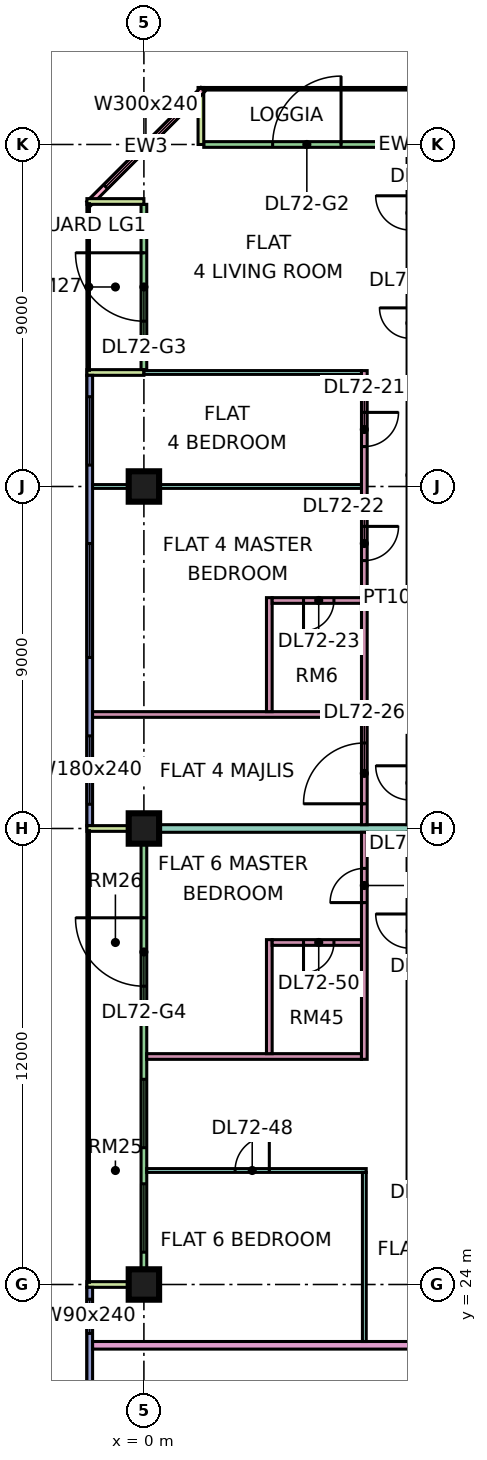
"""IFC4 building model, lengths in metres.
Left out: names, types, materials, properties, quantities, classifications, styles, units other than length and angle.
Written with IfcOpenShell. Run it as: python <this file> out.ifc"""

import sys

from ifc_helpers import new_model, si_unit, direction, frame, frame_2d, origin, origin_2d, place, context, subcontext, project, spatial, rectangle, extrude, element, fill, save


model = new_model("IFC4")
c1 = context("Model", 3, precision=1e-05, world=origin(), true_north=direction((0.0, 1.0)))
c2 = subcontext(c1, "Body", "Model", "MODEL_VIEW")
j1 = project(units=[si_unit("LENGTHUNIT", "METRE"), si_unit("PLANEANGLEUNIT", "RADIAN")], contexts=[c1])
p1 = place(None, origin())
s1 = spatial("IfcSite", under=j1, at=p1, CompositionType="ELEMENT")
p2 = place(p1, origin())
s2 = spatial("IfcBuilding", under=s1, at=p2, CompositionType="ELEMENT")
p3 = place(p2, frame((0.0, 0.0, 307.15)))
s3 = spatial("IfcBuildingStorey", under=s2, at=p3, CompositionType="ELEMENT", Elevation=307.15)
p4 = place(p3, frame((0.0, 24.0, 0.0), z_axis=(0.0, 0.0, 1.0), x_axis=(1.0, 0.0, 0.0)))
e1 = element("IfcColumn", 1, at=p4, inside=s3, PredefinedType="COLUMN", context=c2, shape_type="SweptSolid", body=[
    extrude(rectangle(XDim=0.8, YDim=0.8, at=origin_2d()), origin(), (0.0, 0.0, 1.0), 3.75),
])
p5 = place(p3, frame((0.0, 36.0, 0.0), z_axis=(0.0, 0.0, 1.0), x_axis=(1.0, 0.0, 0.0)))
e2 = element("IfcColumn", 2, at=p5, inside=s3, PredefinedType="COLUMN", context=c2, shape_type="SweptSolid", body=[
    extrude(rectangle(XDim=0.8, YDim=0.8, at=origin_2d()), origin(), (0.0, 0.0, 1.0), 3.75),
])
p6 = place(p3, frame((0.0, 45.0, 0.0), z_axis=(0.0, 0.0, 1.0), x_axis=(1.0, 0.0, 0.0)))
e3 = element("IfcColumn", 3, at=p6, inside=s3, PredefinedType="COLUMN", context=c2, shape_type="SweptSolid", body=[
    extrude(rectangle(XDim=0.8, YDim=0.8, at=origin_2d()), origin(), (0.0, 0.0, 1.0), 3.75),
])
p7 = place(p3, frame((11.925, 54.0, 0.0), z_axis=(0.0, 0.0, 1.0), x_axis=(-1.0, 0.0, 0.0)))
e4 = element("IfcWall", 4, at=p7, inside=s3, PredefinedType="SOLIDWALL", context=c2, shape_type="SweptSolid", body=[
    extrude(rectangle(XDim=10.35, YDim=0.15, at=frame_2d((5.175, 0.0))), origin(), (0.0, 0.0, 1.0), 3.35),
])
p8 = place(p7, frame((6.738, 0.0, 0.0)))
e5 = element("IfcOpeningElement", 5, at=p8, cuts=e4, PredefinedType="OPENING", context=c2, shape_type="SweptSolid", body=[
    extrude(rectangle(XDim=1.8, YDim=2.4, at=frame_2d((0.9, 1.2))), frame((0.0, 0.085, 0.0), z_axis=(0.0, -1.0, 0.0), x_axis=(1.0, 0.0, 0.0)), (0.0, 0.0, 1.0), 0.17),
])
p9 = place(p3, frame((1.5, 55.5, 0.0), z_axis=(0.0, 0.0, 1.0), x_axis=(0.0, -1.0, 0.0)))
e6 = element("IfcWall", 6, at=p9, inside=s3, PredefinedType="SOLIDWALL", context=c2, shape_type="SweptSolid", body=[
    extrude(rectangle(XDim=1.5, YDim=0.15, at=frame_2d((0.75, 0.0))), origin(), (0.0, 0.0, 1.0), 3.35),
])
p10 = place(p3, frame((1.553, 55.447, 0.0), z_axis=(0.0, 0.0, 1.0), x_axis=(-0.707106781187, -0.707106781187, 0.0)))
e7 = element("IfcWall", 7, at=p10, inside=s3, PredefinedType="SOLIDWALL", context=c2, shape_type="SweptSolid", body=[
    extrude(rectangle(XDim=4.243, YDim=0.15, at=frame_2d((2.121, 0.0))), origin(), (0.0, 0.0, 1.0), 3.35),
])
p11 = place(p10, frame((0.621, 0.0, 0.45)))
e8 = element("IfcOpeningElement", 8, at=p11, cuts=e7, PredefinedType="OPENING", context=c2, shape_type="SweptSolid", body=[
    extrude(rectangle(XDim=3.0, YDim=2.4, at=frame_2d((1.5, 1.2))), frame((0.0, 0.085, 0.0), z_axis=(0.0, -1.0, 0.0), x_axis=(1.0, 0.0, 0.0)), (0.0, 0.0, 1.0), 0.17),
])
p12 = place(p3, frame((0.0, 52.425, 0.0), z_axis=(0.0, 0.0, 1.0), x_axis=(0.0, -1.0, 0.0)))
e9 = element("IfcWall", 9, at=p12, inside=s3, PredefinedType="SOLIDWALL", context=c2, shape_type="SweptSolid", body=[
    extrude(rectangle(XDim=4.35, YDim=0.15, at=frame_2d((2.175, 0.0))), origin(), (0.0, 0.0, 1.0), 3.35),
])
p13 = place(p12, frame((1.275, 0.0, 0.0)))
e10 = element("IfcOpeningElement", 10, at=p13, cuts=e9, PredefinedType="OPENING", context=c2, shape_type="SweptSolid", body=[
    extrude(rectangle(XDim=1.8, YDim=2.4, at=frame_2d((0.9, 1.2))), frame((0.0, 0.085, 0.0), z_axis=(0.0, -1.0, 0.0), x_axis=(1.0, 0.0, 0.0)), (0.0, 0.0, 1.0), 0.17),
])
for number, where, z_axis, x_axis in (
    (11, (-1.5, 52.5, 0.0), (0.0, 0.0, 1.0), (1.0, 0.0, 0.0)),
    (12, (-1.5, 48.0, 0.0), (0.0, 0.0, 1.0), (1.0, 0.0, 0.0)),
):
    element("IfcWall", number, at=place(p3, frame(where, z_axis=z_axis, x_axis=x_axis)), inside=s3, PredefinedType="SOLIDWALL", context=c2, shape_type="SweptSolid", body=[
        extrude(rectangle(XDim=1.5, YDim=0.15, at=frame_2d((0.75, 0.0))), origin(), (0.0, 0.0, 1.0), 3.35),
    ])
p14 = place(p3, frame((-1.425, 47.925, 0.0), z_axis=(0.0, 0.0, 1.0), x_axis=(0.0, -1.0, 0.0)))
e13 = element("IfcWall", 13, at=p14, inside=s3, PredefinedType="SOLIDWALL", context=c2, shape_type="SweptSolid", body=[
    extrude(rectangle(XDim=11.85, YDim=0.15, at=frame_2d((5.925, 0.0))), origin(), (0.0, 0.0, 1.0), 3.35),
])
p15 = place(p14, frame((0.562, 0.0, 0.45)))
e14 = element("IfcOpeningElement", 14, at=p15, cuts=e13, PredefinedType="OPENING", context=c2, shape_type="SweptSolid", body=[
    extrude(rectangle(XDim=1.8, YDim=2.4, at=frame_2d((0.9, 1.2))), frame((0.0, 0.085, 0.0), z_axis=(0.0, -1.0, 0.0), x_axis=(1.0, 0.0, 0.0)), (0.0, 0.0, 1.0), 0.17),
])
p16 = place(p14, frame((4.425, 0.0, 0.45)))
e15 = element("IfcOpeningElement", 15, at=p16, cuts=e13, PredefinedType="OPENING", context=c2, shape_type="SweptSolid", body=[
    extrude(rectangle(XDim=3.0, YDim=2.4, at=frame_2d((1.5, 1.2))), frame((0.0, 0.085, 0.0), z_axis=(0.0, -1.0, 0.0), x_axis=(1.0, 0.0, 0.0)), (0.0, 0.0, 1.0), 0.17),
])
p17 = place(p14, frame((9.488, 0.0, 0.45)))
e16 = element("IfcOpeningElement", 16, at=p17, cuts=e13, PredefinedType="OPENING", context=c2, shape_type="SweptSolid", body=[
    extrude(rectangle(XDim=1.8, YDim=2.4, at=frame_2d((0.9, 1.2))), frame((0.0, 0.085, 0.0), z_axis=(0.0, -1.0, 0.0), x_axis=(1.0, 0.0, 0.0)), (0.0, 0.0, 1.0), 0.17),
])
p18 = place(p3, frame((0.0, 35.925, 0.0), z_axis=(0.0, 0.0, 1.0), x_axis=(0.0, -1.0, 0.0)))
e17 = element("IfcWall", 17, at=p18, inside=s3, PredefinedType="SOLIDWALL", context=c2, shape_type="SweptSolid", body=[
    extrude(rectangle(XDim=11.85, YDim=0.15, at=frame_2d((5.925, 0.0))), origin(), (0.0, 0.0, 1.0), 3.35),
])
p19 = place(p18, frame((2.275, 0.0, 0.0)))
e18 = element("IfcOpeningElement", 18, at=p19, cuts=e17, PredefinedType="OPENING", context=c2, shape_type="SweptSolid", body=[
    extrude(rectangle(XDim=1.8, YDim=2.4, at=frame_2d((0.9, 1.2))), frame((0.0, 0.085, 0.0), z_axis=(0.0, -1.0, 0.0), x_axis=(1.0, 0.0, 0.0)), (0.0, 0.0, 1.0), 0.17),
])
p20 = place(p18, frame((6.525, 0.0, 0.45)))
e19 = element("IfcOpeningElement", 19, at=p20, cuts=e17, PredefinedType="OPENING", context=c2, shape_type="SweptSolid", body=[
    extrude(rectangle(XDim=1.8, YDim=2.4, at=frame_2d((0.9, 1.2))), frame((0.0, 0.085, 0.0), z_axis=(0.0, -1.0, 0.0), x_axis=(1.0, 0.0, 0.0)), (0.0, 0.0, 1.0), 0.17),
])
p21 = place(p18, frame((9.275, 0.0, 0.45)))
e20 = element("IfcOpeningElement", 20, at=p21, cuts=e17, PredefinedType="OPENING", context=c2, shape_type="SweptSolid", body=[
    extrude(rectangle(XDim=1.8, YDim=2.4, at=frame_2d((0.9, 1.2))), frame((0.0, 0.085, 0.0), z_axis=(0.0, -1.0, 0.0), x_axis=(1.0, 0.0, 0.0)), (0.0, 0.0, 1.0), 0.17),
])
for number, where, z_axis, x_axis in (
    (21, (-1.5, 36.0, 0.0), (0.0, 0.0, 1.0), (1.0, 0.0, 0.0)),
    (22, (-1.5, 24.0, 0.0), (0.0, 0.0, 1.0), (1.0, 0.0, 0.0)),
):
    element("IfcWall", number, at=place(p3, frame(where, z_axis=z_axis, x_axis=x_axis)), inside=s3, PredefinedType="SOLIDWALL", context=c2, shape_type="SweptSolid", body=[
        extrude(rectangle(XDim=1.5, YDim=0.15, at=frame_2d((0.75, 0.0))), origin(), (0.0, 0.0, 1.0), 3.35),
    ])
p22 = place(p3, frame((-1.425, 23.925, 0.0), z_axis=(0.0, 0.0, 1.0), x_axis=(0.0, -1.0, 0.0)))
e23 = element("IfcWall", 23, at=p22, inside=s3, PredefinedType="SOLIDWALL", context=c2, shape_type="SweptSolid", body=[
    extrude(rectangle(XDim=11.425, YDim=0.15, at=frame_2d((5.712, 0.0))), origin(), (0.0, 0.0, 1.0), 3.35),
])
p23 = place(p22, frame((0.312, 0.0, 0.45)))
e24 = element("IfcOpeningElement", 24, at=p23, cuts=e23, PredefinedType="OPENING", context=c2, shape_type="SweptSolid", body=[
    extrude(rectangle(XDim=0.9, YDim=2.4, at=frame_2d((0.45, 1.2))), frame((0.0, 0.085, 0.0), z_axis=(0.0, -1.0, 0.0), x_axis=(1.0, 0.0, 0.0)), (0.0, 0.0, 1.0), 0.17),
])
p24 = place(p22, frame((6.175, 0.0, 0.45)))
e25 = element("IfcOpeningElement", 25, at=p24, cuts=e23, PredefinedType="OPENING", context=c2, shape_type="SweptSolid", body=[
    extrude(rectangle(XDim=3.0, YDim=2.4, at=frame_2d((1.5, 1.2))), frame((0.0, 0.085, 0.0), z_axis=(0.0, -1.0, 0.0), x_axis=(1.0, 0.0, 0.0)), (0.0, 0.0, 1.0), 0.17),
])
p25 = place(p3, frame((-1.351, 39.0, 0.0), z_axis=(0.0, 0.0, 1.0), x_axis=(1.0, 0.0, 0.0)))
e26 = element("IfcWall", 26, at=p25, inside=s3, PredefinedType="PARTITIONING", context=c2, shape_type="SweptSolid", body=[
    extrude(rectangle(XDim=7.076, YDim=0.15, at=frame_2d((3.538, 0.0))), origin(), (0.0, 0.0, 1.0), 3.35),
])
p26 = place(p3, frame((-1.351, 45.0, 0.0), z_axis=(0.0, 0.0, 1.0), x_axis=(1.0, 0.0, 0.0)))
e27 = element("IfcWall", 27, at=p26, inside=s3, PredefinedType="PARTITIONING", context=c2, shape_type="SweptSolid", body=[
    extrude(rectangle(XDim=7.076, YDim=0.1, at=frame_2d((3.538, 0.0))), origin(), (0.0, 0.0, 1.0), 3.35),
])
p27 = place(p3, frame((-1.35, 22.4, 0.0), z_axis=(0.0, 0.0, 1.0), x_axis=(1.0, 0.0, 0.0)))
e28 = element("IfcWall", 28, at=p27, inside=s3, PredefinedType="PARTITIONING", context=c2, shape_type="SweptSolid", body=[
    extrude(rectangle(XDim=13.65, YDim=0.2, at=frame_2d((6.825, 0.0))), origin(), (0.0, 0.0, 1.0), 3.35),
])
e29 = element("IfcWall", 29, at=p5, inside=s3, PredefinedType="PARTITIONING", context=c2, shape_type="SweptSolid", body=[
    extrude(rectangle(XDim=12.3, YDim=0.2, at=frame_2d((6.15, 0.0))), origin(), (0.0, 0.0, 1.0), 3.35),
])
p28 = place(p3, frame((0.0, 48.0, 0.0), z_axis=(0.0, 0.0, 1.0), x_axis=(1.0, 0.0, 0.0)))
e30 = element("IfcWall", 30, at=p28, inside=s3, PredefinedType="PARTITIONING", context=c2, shape_type="SweptSolid", body=[
    extrude(rectangle(XDim=5.725, YDim=0.1, at=frame_2d((2.863, 0.0))), origin(), (0.0, 0.0, 1.0), 3.35),
])
p29 = place(p3, frame((0.074, 27.0, 0.0), z_axis=(0.0, 0.0, 1.0), x_axis=(1.0, 0.0, 0.0)))
e31 = element("IfcWall", 31, at=p29, inside=s3, PredefinedType="PARTITIONING", context=c2, shape_type="SweptSolid", body=[
    extrude(rectangle(XDim=5.776, YDim=0.1, at=frame_2d((2.888, 0.0))), origin(), (0.0, 0.0, 1.0), 3.35),
])
p30 = place(p29, frame((2.326, 0.0, 0.0)))
e32 = element("IfcOpeningElement", 32, at=p30, cuts=e31, PredefinedType="OPENING", context=c2, shape_type="SweptSolid", body=[
    extrude(rectangle(XDim=0.9, YDim=2.1, at=frame_2d((0.45, 1.05))), frame((0.0, 0.06, 0.0), z_axis=(0.0, -1.0, 0.0), x_axis=(1.0, 0.0, 0.0)), (0.0, 0.0, 1.0), 0.12),
])
p31 = place(p3, frame((0.074, 30.0, 0.0), z_axis=(0.0, 0.0, 1.0), x_axis=(1.0, 0.0, 0.0)))
e33 = element("IfcWall", 33, at=p31, inside=s3, PredefinedType="PARTITIONING", context=c2, shape_type="SweptSolid", body=[
    extrude(rectangle(XDim=5.651, YDim=0.15, at=frame_2d((2.826, 0.0))), origin(), (0.0, 0.0, 1.0), 3.35),
])
for number, where, z_axis, x_axis in (
    (34, (3.3, 30.075, 0.0), (0.0, 0.0, 1.0), (0.0, 1.0, 0.0)),
    (35, (3.3, 39.075, 0.0), (0.0, 0.0, 1.0), (0.0, 1.0, 0.0)),
):
    element("IfcWall", number, at=place(p3, frame(where, z_axis=z_axis, x_axis=x_axis)), inside=s3, PredefinedType="PARTITIONING", context=c2, shape_type="SweptSolid", body=[
        extrude(rectangle(XDim=3.0, YDim=0.15, at=frame_2d((1.5, 0.0))), origin(), (0.0, 0.0, 1.0), 3.35),
    ])
p32 = place(p3, frame((3.375, 33.0, 0.0), z_axis=(0.0, 0.0, 1.0), x_axis=(1.0, 0.0, 0.0)))
e36 = element("IfcWall", 36, at=p32, inside=s3, PredefinedType="PARTITIONING", context=c2, shape_type="SweptSolid", body=[
    extrude(rectangle(XDim=2.35, YDim=0.15, at=frame_2d((1.175, 0.0))), origin(), (0.0, 0.0, 1.0), 3.35),
])
p33 = place(p32, frame((0.825, 0.0, 0.0)))
e37 = element("IfcOpeningElement", 37, at=p33, cuts=e36, PredefinedType="OPENING", context=c2, shape_type="SweptSolid", body=[
    extrude(rectangle(XDim=0.8, YDim=2.1, at=frame_2d((0.4, 1.05))), frame((0.0, 0.085, 0.0), z_axis=(0.0, -1.0, 0.0), x_axis=(1.0, 0.0, 0.0)), (0.0, 0.0, 1.0), 0.17),
])
p34 = place(p3, frame((3.375, 42.0, 0.0), z_axis=(0.0, 0.0, 1.0), x_axis=(1.0, 0.0, 0.0)))
e38 = element("IfcWall", 38, at=p34, inside=s3, PredefinedType="PARTITIONING", context=c2, shape_type="SweptSolid", body=[
    extrude(rectangle(XDim=2.35, YDim=0.15, at=frame_2d((1.175, 0.0))), origin(), (0.0, 0.0, 1.0), 3.35),
])
p35 = place(p34, frame((0.825, 0.0, 0.0)))
e39 = element("IfcOpeningElement", 39, at=p35, cuts=e38, PredefinedType="OPENING", context=c2, shape_type="SweptSolid", body=[
    extrude(rectangle(XDim=0.8, YDim=2.1, at=frame_2d((0.4, 1.05))), frame((0.0, 0.085, 0.0), z_axis=(0.0, -1.0, 0.0), x_axis=(1.0, 0.0, 0.0)), (0.0, 0.0, 1.0), 0.17),
])
p36 = place(p3, frame((5.8, 22.5, 0.0), z_axis=(0.0, 0.0, 1.0), x_axis=(0.0, 1.0, 0.0)))
e40 = element("IfcWall", 40, at=p36, inside=s3, PredefinedType="PARTITIONING", context=c2, shape_type="SweptSolid", body=[
    extrude(rectangle(XDim=4.45, YDim=0.1, at=frame_2d((2.225, 0.0))), origin(), (0.0, 0.0, 1.0), 3.35),
])
p37 = place(p3, frame((5.8, 29.925, 0.0), z_axis=(0.0, 0.0, 1.0), x_axis=(0.0, 1.0, 0.0)))
e41 = element("IfcWall", 41, at=p37, inside=s3, PredefinedType="PARTITIONING", context=c2, shape_type="SweptSolid", body=[
    extrude(rectangle(XDim=5.975, YDim=0.15, at=frame_2d((2.987, 0.0))), origin(), (0.0, 0.0, 1.0), 3.35),
])
p38 = place(p37, frame((4.125, 0.0, 0.0)))
e42 = element("IfcOpeningElement", 42, at=p38, cuts=e41, PredefinedType="OPENING", context=c2, shape_type="SweptSolid", body=[
    extrude(rectangle(XDim=0.9, YDim=2.1, at=frame_2d((0.45, 1.05))), frame((0.0, 0.085, 0.0), z_axis=(0.0, -1.0, 0.0), x_axis=(1.0, 0.0, 0.0)), (0.0, 0.0, 1.0), 0.17),
])
p39 = place(p3, frame((5.8, 36.1, 0.0), z_axis=(0.0, 0.0, 1.0), x_axis=(0.0, 1.0, 0.0)))
e43 = element("IfcWall", 43, at=p39, inside=s3, PredefinedType="PARTITIONING", context=c2, shape_type="SweptSolid", body=[
    extrude(rectangle(XDim=11.95, YDim=0.15, at=frame_2d((5.975, 0.0))), origin(), (0.0, 0.0, 1.0), 3.35),
])
p40 = place(p39, frame((9.95, 0.0, 0.0)))
e44 = element("IfcOpeningElement", 44, at=p40, cuts=e43, PredefinedType="OPENING", context=c2, shape_type="SweptSolid", body=[
    extrude(rectangle(XDim=0.9, YDim=2.1, at=frame_2d((0.45, 1.05))), frame((0.0, 0.085, 0.0), z_axis=(0.0, -1.0, 0.0), x_axis=(1.0, 0.0, 0.0)), (0.0, 0.0, 1.0), 0.17),
])
p41 = place(p39, frame((6.95, 0.0, 0.0)))
e45 = element("IfcOpeningElement", 45, at=p41, cuts=e43, PredefinedType="OPENING", context=c2, shape_type="SweptSolid", body=[
    extrude(rectangle(XDim=0.9, YDim=2.1, at=frame_2d((0.45, 1.05))), frame((0.0, 0.085, 0.0), z_axis=(0.0, -1.0, 0.0), x_axis=(1.0, 0.0, 0.0)), (0.0, 0.0, 1.0), 0.17),
])
p42 = place(p39, frame((0.55, 0.0, 0.0)))
e46 = element("IfcOpeningElement", 46, at=p42, cuts=e43, PredefinedType="OPENING", context=c2, shape_type="SweptSolid", body=[
    extrude(rectangle(XDim=1.6, YDim=2.1, at=frame_2d((0.8, 1.05))), frame((0.0, 0.085, 0.0), z_axis=(0.0, -1.0, 0.0), x_axis=(1.0, 0.0, 0.0)), (0.0, 0.0, 1.0), 0.17),
])
p43 = place(p8, frame((1.8, 0.0, 0.0), z_axis=(0.0, 0.0, 1.0), x_axis=(-1.0, 0.0, 0.0)))
e47 = element("IfcDoor", 47, at=p43, inside=s3, OperationType="DOUBLE_DOOR_SINGLE_SWING", PredefinedType="DOOR", context=c2, shape_type="SweptSolid", body=[
    extrude(rectangle(XDim=1.8, YDim=2.4, at=frame_2d((0.9, 1.2))), frame((0.0, 0.025, 0.0), z_axis=(0.0, -1.0, 0.0), x_axis=(1.0, 0.0, 0.0)), (0.0, 0.0, 1.0), 0.05),
])
fill(e5, e47)
p44 = place(p11, origin())
e48 = element("IfcWindow", 48, at=p44, inside=s3, PartitioningType="SINGLE_PANEL", PredefinedType="WINDOW", context=c2, shape_type="SweptSolid", body=[
    extrude(rectangle(XDim=3.0, YDim=2.4, at=frame_2d((1.5, 1.2))), frame((0.0, 0.03, 0.0), z_axis=(0.0, -1.0, 0.0), x_axis=(1.0, 0.0, 0.0)), (0.0, 0.0, 1.0), 0.06),
])
fill(e8, e48)
p45 = place(p13, frame((1.8, 0.0, 0.0), z_axis=(0.0, 0.0, 1.0), x_axis=(-1.0, 0.0, 0.0)))
e49 = element("IfcDoor", 49, at=p45, inside=s3, OperationType="DOUBLE_DOOR_SINGLE_SWING", PredefinedType="DOOR", context=c2, shape_type="SweptSolid", body=[
    extrude(rectangle(XDim=1.8, YDim=2.4, at=frame_2d((0.9, 1.2))), frame((0.0, 0.025, 0.0), z_axis=(0.0, -1.0, 0.0), x_axis=(1.0, 0.0, 0.0)), (0.0, 0.0, 1.0), 0.05),
])
fill(e10, e49)
p46 = place(p15, origin())
e50 = element("IfcWindow", 50, at=p46, inside=s3, PartitioningType="SINGLE_PANEL", PredefinedType="WINDOW", context=c2, shape_type="SweptSolid", body=[
    extrude(rectangle(XDim=1.8, YDim=2.4, at=frame_2d((0.9, 1.2))), frame((0.0, 0.03, 0.0), z_axis=(0.0, -1.0, 0.0), x_axis=(1.0, 0.0, 0.0)), (0.0, 0.0, 1.0), 0.06),
])
fill(e14, e50)
p47 = place(p16, origin())
e51 = element("IfcWindow", 51, at=p47, inside=s3, PartitioningType="SINGLE_PANEL", PredefinedType="WINDOW", context=c2, shape_type="SweptSolid", body=[
    extrude(rectangle(XDim=3.0, YDim=2.4, at=frame_2d((1.5, 1.2))), frame((0.0, 0.03, 0.0), z_axis=(0.0, -1.0, 0.0), x_axis=(1.0, 0.0, 0.0)), (0.0, 0.0, 1.0), 0.06),
])
fill(e15, e51)
p48 = place(p17, origin())
e52 = element("IfcWindow", 52, at=p48, inside=s3, PartitioningType="SINGLE_PANEL", PredefinedType="WINDOW", context=c2, shape_type="SweptSolid", body=[
    extrude(rectangle(XDim=1.8, YDim=2.4, at=frame_2d((0.9, 1.2))), frame((0.0, 0.03, 0.0), z_axis=(0.0, -1.0, 0.0), x_axis=(1.0, 0.0, 0.0)), (0.0, 0.0, 1.0), 0.06),
])
fill(e16, e52)
p49 = place(p19, frame((1.8, 0.0, 0.0), z_axis=(0.0, 0.0, 1.0), x_axis=(-1.0, 0.0, 0.0)))
e53 = element("IfcDoor", 53, at=p49, inside=s3, OperationType="DOUBLE_DOOR_SINGLE_SWING", PredefinedType="DOOR", context=c2, shape_type="SweptSolid", body=[
    extrude(rectangle(XDim=1.8, YDim=2.4, at=frame_2d((0.9, 1.2))), frame((0.0, 0.025, 0.0), z_axis=(0.0, -1.0, 0.0), x_axis=(1.0, 0.0, 0.0)), (0.0, 0.0, 1.0), 0.05),
])
fill(e18, e53)
p50 = place(p20, origin())
e54 = element("IfcWindow", 54, at=p50, inside=s3, PartitioningType="SINGLE_PANEL", PredefinedType="WINDOW", context=c2, shape_type="SweptSolid", body=[
    extrude(rectangle(XDim=1.8, YDim=2.4, at=frame_2d((0.9, 1.2))), frame((0.0, 0.03, 0.0), z_axis=(0.0, -1.0, 0.0), x_axis=(1.0, 0.0, 0.0)), (0.0, 0.0, 1.0), 0.06),
])
fill(e19, e54)
p51 = place(p21, origin())
e55 = element("IfcWindow", 55, at=p51, inside=s3, PartitioningType="SINGLE_PANEL", PredefinedType="WINDOW", context=c2, shape_type="SweptSolid", body=[
    extrude(rectangle(XDim=1.8, YDim=2.4, at=frame_2d((0.9, 1.2))), frame((0.0, 0.03, 0.0), z_axis=(0.0, -1.0, 0.0), x_axis=(1.0, 0.0, 0.0)), (0.0, 0.0, 1.0), 0.06),
])
fill(e20, e55)
p52 = place(p23, origin())
e56 = element("IfcWindow", 56, at=p52, inside=s3, PartitioningType="SINGLE_PANEL", PredefinedType="WINDOW", context=c2, shape_type="SweptSolid", body=[
    extrude(rectangle(XDim=0.9, YDim=2.4, at=frame_2d((0.45, 1.2))), frame((0.0, 0.03, 0.0), z_axis=(0.0, -1.0, 0.0), x_axis=(1.0, 0.0, 0.0)), (0.0, 0.0, 1.0), 0.06),
])
fill(e24, e56)
p53 = place(p40, origin())
e57 = element("IfcDoor", 57, at=p53, inside=s3, OperationType="SINGLE_SWING_RIGHT", PredefinedType="DOOR", context=c2, shape_type="SweptSolid", body=[
    extrude(rectangle(XDim=0.9, YDim=2.1, at=frame_2d((0.45, 1.05))), frame((0.0, 0.025, 0.0), z_axis=(0.0, -1.0, 0.0), x_axis=(1.0, 0.0, 0.0)), (0.0, 0.0, 1.0), 0.05),
])
fill(e44, e57)
p54 = place(p41, origin())
e58 = element("IfcDoor", 58, at=p54, inside=s3, OperationType="SINGLE_SWING_RIGHT", PredefinedType="DOOR", context=c2, shape_type="SweptSolid", body=[
    extrude(rectangle(XDim=0.9, YDim=2.1, at=frame_2d((0.45, 1.05))), frame((0.0, 0.025, 0.0), z_axis=(0.0, -1.0, 0.0), x_axis=(1.0, 0.0, 0.0)), (0.0, 0.0, 1.0), 0.05),
])
fill(e45, e58)
p55 = place(p35, frame((0.8, 0.0, 0.0), z_axis=(0.0, 0.0, 1.0), x_axis=(-1.0, 0.0, 0.0)))
e59 = element("IfcDoor", 59, at=p55, inside=s3, OperationType="SINGLE_SWING_LEFT", PredefinedType="DOOR", context=c2, shape_type="SweptSolid", body=[
    extrude(rectangle(XDim=0.8, YDim=2.1, at=frame_2d((0.4, 1.05))), frame((0.0, 0.025, 0.0), z_axis=(0.0, -1.0, 0.0), x_axis=(1.0, 0.0, 0.0)), (0.0, 0.0, 1.0), 0.05),
])
fill(e39, e59)
p56 = place(p42, origin())
e60 = element("IfcDoor", 60, at=p56, inside=s3, OperationType="DOUBLE_DOOR_SINGLE_SWING", PredefinedType="DOOR", context=c2, shape_type="SweptSolid", body=[
    extrude(rectangle(XDim=1.6, YDim=2.1, at=frame_2d((0.8, 1.05))), frame((0.0, 0.025, 0.0), z_axis=(0.0, -1.0, 0.0), x_axis=(1.0, 0.0, 0.0)), (0.0, 0.0, 1.0), 0.05),
])
fill(e46, e60)
p57 = place(p30, frame((0.9, 0.0, 0.0), z_axis=(0.0, 0.0, 1.0), x_axis=(-1.0, 0.0, 0.0)))
e61 = element("IfcDoor", 61, at=p57, inside=s3, OperationType="SINGLE_SWING_RIGHT", PredefinedType="DOOR", context=c2, shape_type="SweptSolid", body=[
    extrude(rectangle(XDim=0.9, YDim=2.1, at=frame_2d((0.45, 1.05))), frame((0.0, 0.025, 0.0), z_axis=(0.0, -1.0, 0.0), x_axis=(1.0, 0.0, 0.0)), (0.0, 0.0, 1.0), 0.05),
])
fill(e32, e61)
p58 = place(p38, origin())
e62 = element("IfcDoor", 62, at=p58, inside=s3, OperationType="SINGLE_SWING_LEFT", PredefinedType="DOOR", context=c2, shape_type="SweptSolid", body=[
    extrude(rectangle(XDim=0.9, YDim=2.1, at=frame_2d((0.45, 1.05))), frame((0.0, 0.025, 0.0), z_axis=(0.0, -1.0, 0.0), x_axis=(1.0, 0.0, 0.0)), (0.0, 0.0, 1.0), 0.05),
])
fill(e42, e62)
p59 = place(p33, frame((0.8, 0.0, 0.0), z_axis=(0.0, 0.0, 1.0), x_axis=(-1.0, 0.0, 0.0)))
e63 = element("IfcDoor", 63, at=p59, inside=s3, OperationType="SINGLE_SWING_LEFT", PredefinedType="DOOR", context=c2, shape_type="SweptSolid", body=[
    extrude(rectangle(XDim=0.8, YDim=2.1, at=frame_2d((0.4, 1.05))), frame((0.0, 0.025, 0.0), z_axis=(0.0, -1.0, 0.0), x_axis=(1.0, 0.0, 0.0)), (0.0, 0.0, 1.0), 0.05),
])
fill(e37, e63)
save(model, sys.argv[1])
